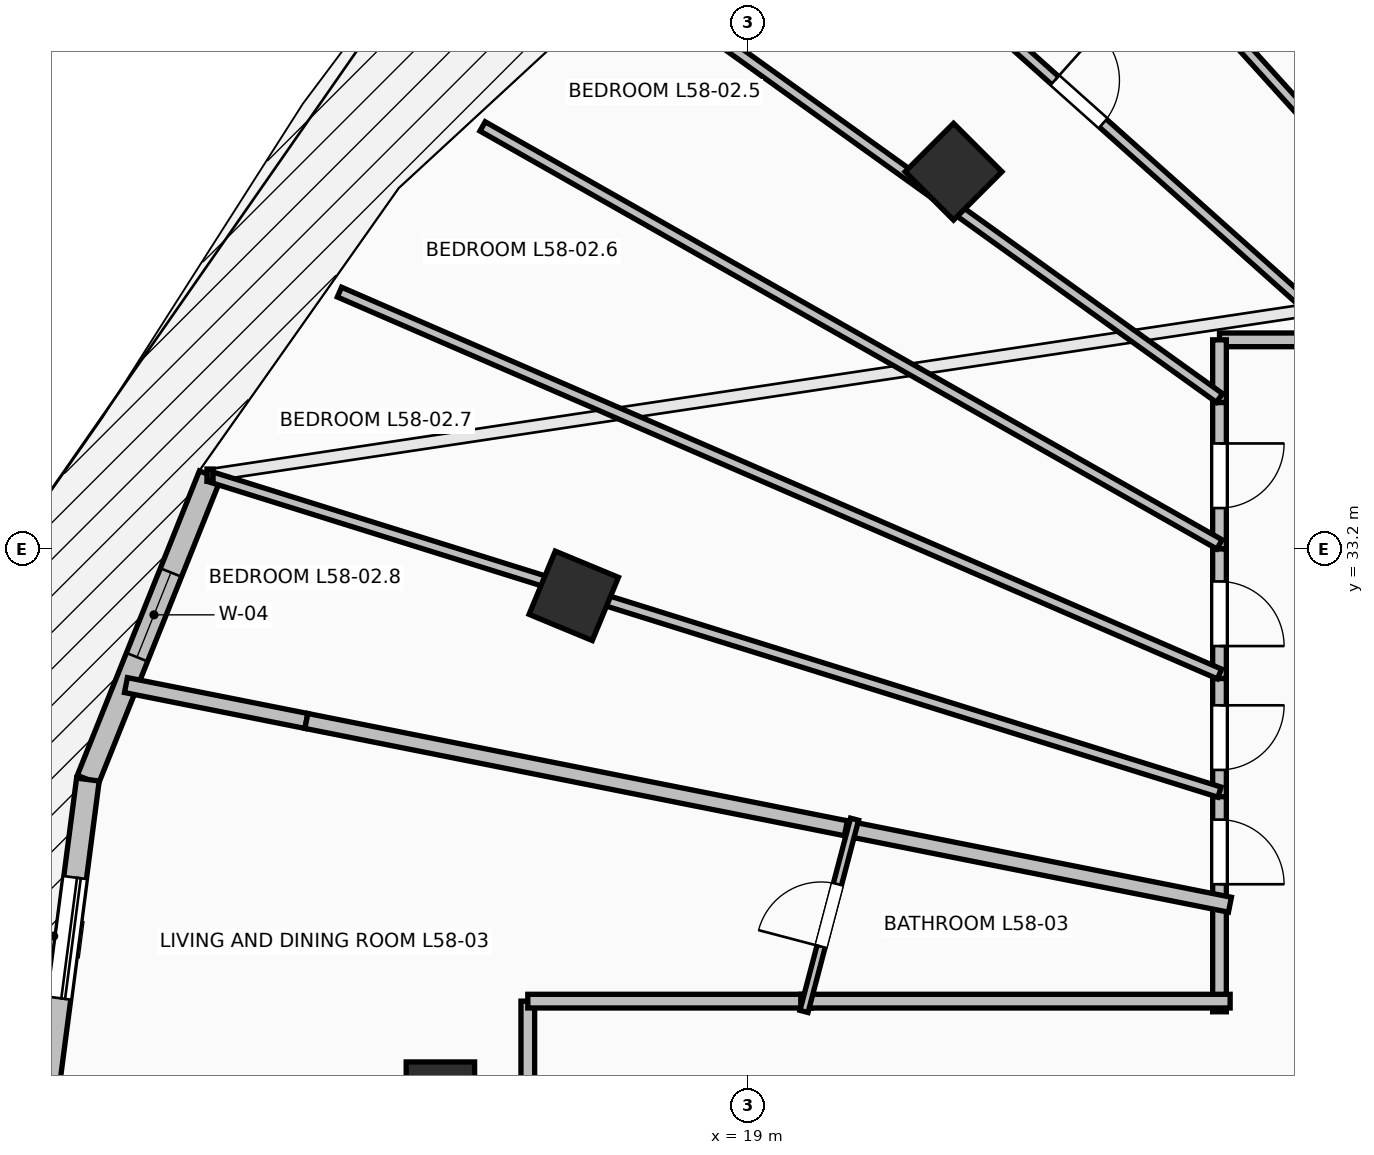
"""IFC4 building model, lengths in metres.
Left out: names, types, materials, properties, quantities, classifications, styles, units other than length and angle.
Written with IfcOpenShell. Run it as: python <this file> out.ifc"""

import sys

from ifc_helpers import new_model, si_unit, direction, frame, frame_2d, origin, origin_2d, place, context, subcontext, project, spatial, rectangle, extrude, element, fill, save


model = new_model("IFC4")
c1 = context("Model", 3, precision=1e-05, world=origin(), true_north=direction((0.0, 1.0)))
c2 = subcontext(c1, "Body", "Model", "MODEL_VIEW")
j1 = project(units=[si_unit("LENGTHUNIT", "METRE"), si_unit("PLANEANGLEUNIT", "RADIAN")], contexts=[c1])
p1 = place(None, origin())
s1 = spatial("IfcSite", under=j1, at=p1, CompositionType="ELEMENT")
p2 = place(p1, origin())
s2 = spatial("IfcBuilding", under=s1, at=p2, CompositionType="ELEMENT")
p3 = place(p2, frame((0.0, 0.0, 214.3)))
s3 = spatial("IfcBuildingStorey", under=s2, at=p3, CompositionType="ELEMENT", Elevation=214.3)
for number, where, z_axis, x_axis in (
    (1, (21.701, 38.162, 0.0), (0.0, 0.0, 1.0), (-0.707, 0.707, 0.0)),
    (2, (16.705, 32.582, 0.0), (0.0, 0.0, 1.0), (-0.924, 0.383, 0.0)),
    (3, (14.95, 26.0, 0.0), (0.0, 0.0, 1.0), (-1.0, 0.0, 0.0)),
):
    element("IfcColumn", number, at=place(p3, frame(where, z_axis=z_axis, x_axis=x_axis)), inside=s3, PredefinedType="COLUMN", context=c2, shape_type="SweptSolid", body=[
        extrude(rectangle(XDim=0.9, YDim=0.9, at=origin_2d()), origin(), (0.0, 0.0, 1.0), 3.55),
    ])
p4 = place(p3, frame((11.919, 34.17, 0.0), z_axis=(0.0, 0.0, 1.0), x_axis=(-0.372268409848, -0.928125116043, 0.0)))
e4 = element("IfcWall", 4, at=p4, inside=s3, PredefinedType="STANDARD", context=c2, shape_type="SweptSolid", body=[
    extrude(rectangle(XDim=4.315, YDim=0.3, at=frame_2d((2.158, 0.0))), origin(), (0.0, 0.0, 1.0), 3.29),
])
p5 = place(p4, frame((1.38, 0.0, 0.85)))
e5 = element("IfcOpeningElement", 5, at=p5, cuts=e4, PredefinedType="OPENING", context=c2, shape_type="SweptSolid", body=[
    extrude(rectangle(XDim=1.2, YDim=1.95, at=frame_2d((0.6, 0.975))), frame((0.0, 0.165, 0.0), z_axis=(0.0, -1.0, 0.0), x_axis=(1.0, 0.0, 0.0)), (0.0, 0.0, 1.0), 0.33),
])
p6 = place(p3, frame((10.312, 30.165, 0.0), z_axis=(0.0, 0.0, 1.0), x_axis=(-0.129147853268, -0.991625348605, 0.0)))
e6 = element("IfcWall", 6, at=p6, inside=s3, PredefinedType="STANDARD", context=c2, shape_type="SweptSolid", body=[
    extrude(rectangle(XDim=4.2, YDim=0.3, at=frame_2d((2.1, 0.0))), origin(), (0.0, 0.0, 1.0), 3.29),
])
p7 = place(p6, frame((1.3, 0.0, 0.0)))
e7 = element("IfcOpeningElement", 7, at=p7, cuts=e6, PredefinedType="OPENING", context=c2, shape_type="SweptSolid", body=[
    extrude(rectangle(XDim=1.6, YDim=2.3, at=frame_2d((0.8, 1.15))), frame((0.0, 0.165, 0.0), z_axis=(0.0, -1.0, 0.0), x_axis=(1.0, 0.0, 0.0)), (0.0, 0.0, 1.0), 0.33),
])
p8 = place(p3, frame((26.768, 35.95, 0.0), z_axis=(0.0, 0.0, 1.0), x_axis=(-1.0, 0.0, 0.0)))
e8 = element("IfcWall", 8, at=p8, inside=s3, PredefinedType="PARTITIONING", context=c2, shape_type="SweptSolid", body=[
    extrude(rectangle(XDim=1.568, YDim=0.18, at=frame_2d((0.784, 0.0))), origin(), (0.0, 0.0, 1.0), 3.29),
])
p9 = place(p3, frame((25.2, 35.95, 0.0), z_axis=(0.0, 0.0, 1.0), x_axis=(0.0, -1.0, 0.0)))
e9 = element("IfcWall", 9, at=p9, inside=s3, PredefinedType="PARTITIONING", context=c2, shape_type="SweptSolid", body=[
    extrude(rectangle(XDim=0.825, YDim=0.18, at=frame_2d((0.413, 0.0))), origin(), (0.0, 0.0, 1.0), 2.482),
])
p10 = place(p3, frame((25.2, 35.125, 0.0), z_axis=(0.0, 0.0, 1.0), x_axis=(0.0, -1.0, 0.0)))
e10 = element("IfcWall", 10, at=p10, inside=s3, PredefinedType="PARTITIONING", context=c2, shape_type="SweptSolid", body=[
    extrude(rectangle(XDim=1.926, YDim=0.18, at=frame_2d((0.963, 0.0))), origin(), (0.0, 0.0, 1.0), 2.482),
])
p11 = place(p10, frame((0.538, 0.0, 0.0)))
e11 = element("IfcOpeningElement", 11, at=p11, cuts=e10, PredefinedType="OPENING", context=c2, shape_type="SweptSolid", body=[
    extrude(rectangle(XDim=0.85, YDim=2.1, at=frame_2d((0.425, 1.05))), frame((0.0, 0.105, 0.0), z_axis=(0.0, -1.0, 0.0), x_axis=(1.0, 0.0, 0.0)), (0.0, 0.0, 1.0), 0.21),
])
p12 = place(p3, frame((25.2, 33.199, 0.0), z_axis=(0.0, 0.0, 1.0), x_axis=(0.0, -1.0, 0.0)))
e12 = element("IfcWall", 12, at=p12, inside=s3, PredefinedType="PARTITIONING", context=c2, shape_type="SweptSolid", body=[
    extrude(rectangle(XDim=1.705, YDim=0.18, at=frame_2d((0.853, 0.0))), origin(), (0.0, 0.0, 1.0), 2.979),
])
p13 = place(p12, frame((0.427, 0.0, 0.0)))
e13 = element("IfcOpeningElement", 13, at=p13, cuts=e12, PredefinedType="OPENING", context=c2, shape_type="SweptSolid", body=[
    extrude(rectangle(XDim=0.85, YDim=2.1, at=frame_2d((0.425, 1.05))), frame((0.0, 0.105, 0.0), z_axis=(0.0, -1.0, 0.0), x_axis=(1.0, 0.0, 0.0)), (0.0, 0.0, 1.0), 0.21),
])
p14 = place(p3, frame((25.2, 31.494, 0.0), z_axis=(0.0, 0.0, 1.0), x_axis=(0.0, -1.0, 0.0)))
e14 = element("IfcWall", 14, at=p14, inside=s3, PredefinedType="PARTITIONING", context=c2, shape_type="SweptSolid", body=[
    extrude(rectangle(XDim=1.554, YDim=0.18, at=frame_2d((0.777, 0.0))), origin(), (0.0, 0.0, 1.0), 3.29),
])
p15 = place(p14, frame((0.352, 0.0, 0.0)))
e15 = element("IfcOpeningElement", 15, at=p15, cuts=e14, PredefinedType="OPENING", context=c2, shape_type="SweptSolid", body=[
    extrude(rectangle(XDim=0.85, YDim=2.1, at=frame_2d((0.425, 1.05))), frame((0.0, 0.105, 0.0), z_axis=(0.0, -1.0, 0.0), x_axis=(1.0, 0.0, 0.0)), (0.0, 0.0, 1.0), 0.21),
])
p16 = place(p3, frame((25.2, 29.94, 0.0), z_axis=(0.0, 0.0, 1.0), x_axis=(0.0, -1.0, 0.0)))
e16 = element("IfcWall", 16, at=p16, inside=s3, PredefinedType="PARTITIONING", context=c2, shape_type="SweptSolid", body=[
    extrude(rectangle(XDim=1.454, YDim=0.18, at=frame_2d((0.727, 0.0))), origin(), (0.0, 0.0, 1.0), 2.482),
])
p17 = place(p16, frame((0.302, 0.0, 0.0)))
e17 = element("IfcOpeningElement", 17, at=p17, cuts=e16, PredefinedType="OPENING", context=c2, shape_type="SweptSolid", body=[
    extrude(rectangle(XDim=0.85, YDim=2.1, at=frame_2d((0.425, 1.05))), frame((0.0, 0.105, 0.0), z_axis=(0.0, -1.0, 0.0), x_axis=(1.0, 0.0, 0.0)), (0.0, 0.0, 1.0), 0.21),
])
p18 = place(p3, frame((16.1, 27.25, 0.0), z_axis=(0.0, 0.0, 1.0), x_axis=(0.0, -1.0, 0.0)))
e18 = element("IfcWall", 18, at=p18, inside=s3, PredefinedType="PARTITIONING", context=c2, shape_type="SweptSolid", body=[
    extrude(rectangle(XDim=2.7, YDim=0.18, at=frame_2d((1.35, 0.0))), origin(), (0.0, 0.0, 1.0), 2.482),
])
p19 = place(p3, frame((19.831, 27.25, 0.0), z_axis=(0.0, 0.0, 1.0), x_axis=(-1.0, 0.0, 0.0)))
e19 = element("IfcWall", 19, at=p19, inside=s3, PredefinedType="PARTITIONING", context=c2, shape_type="SweptSolid", body=[
    extrude(rectangle(XDim=3.731, YDim=0.18, at=frame_2d((1.865, 0.0))), origin(), (0.0, 0.0, 1.0), 2.936),
])
p20 = place(p3, frame((25.2, 28.626, 0.0), z_axis=(0.0, 0.0, 1.0), x_axis=(0.0, -1.0, 0.0)))
e20 = element("IfcWall", 20, at=p20, inside=s3, PredefinedType="PARTITIONING", context=c2, shape_type="SweptSolid", body=[
    extrude(rectangle(XDim=1.516, YDim=0.18, at=frame_2d((0.758, 0.0))), origin(), (0.0, 0.0, 1.0), 2.482),
])
p21 = place(p3, frame((25.34, 27.25, 0.0), z_axis=(0.0, 0.0, 1.0), x_axis=(-1.0, 0.0, 0.0)))
e21 = element("IfcWall", 21, at=p21, inside=s3, PredefinedType="PARTITIONING", context=c2, shape_type="SweptSolid", body=[
    extrude(rectangle(XDim=5.649, YDim=0.18, at=frame_2d((2.825, 0.0))), origin(), (0.0, 0.0, 1.0), 2.482),
])
p22 = place(p3, frame((24.46, 44.617, 0.0), z_axis=(0.0, 0.0, 1.0), x_axis=(0.588154087929, -0.808748891098, 0.0)))
e22 = element("IfcWall", 22, at=p22, inside=s3, PredefinedType="PARTITIONING", context=c2, shape_type="SweptSolid", body=[
    extrude(rectangle(XDim=10.717, YDim=0.14, at=frame_2d((5.358, 0.0))), origin(), (0.0, 0.0, 1.0), 2.482),
])
p23 = place(p3, frame((22.077, 43.603, 0.0), z_axis=(0.0, 0.0, 1.0), x_axis=(0.670853853748, -0.741589581177, 0.0)))
e23 = element("IfcWall", 23, at=p23, inside=s3, PredefinedType="PARTITIONING", context=c2, shape_type="SweptSolid", body=[
    extrude(rectangle(XDim=10.32, YDim=0.14, at=frame_2d((5.16, 0.0))), origin(), (0.0, 0.0, 1.0), 2.482),
])
p24 = place(p3, frame((19.844, 42.214, 0.0), z_axis=(0.0, 0.0, 1.0), x_axis=(0.745845988041, -0.666118429502, 0.0)))
e24 = element("IfcWall", 24, at=p24, inside=s3, PredefinedType="PARTITIONING", context=c2, shape_type="SweptSolid", body=[
    extrude(rectangle(XDim=9.404, YDim=0.14, at=frame_2d((4.702, 0.0))), origin(), (0.0, 0.0, 1.0), 2.824),
])
p25 = place(p24, frame((4.277, 0.0, 0.0)))
e25 = element("IfcOpeningElement", 25, at=p25, cuts=e24, PredefinedType="OPENING", context=c2, shape_type="SweptSolid", body=[
    extrude(rectangle(XDim=0.85, YDim=2.1, at=frame_2d((0.425, 1.05))), frame((0.0, 0.085, 0.0), z_axis=(0.0, -1.0, 0.0), x_axis=(1.0, 0.0, 0.0)), (0.0, 0.0, 1.0), 0.17),
])
p26 = place(p3, frame((17.568, 40.662, 0.0), z_axis=(0.0, 0.0, 1.0), x_axis=(0.812435479674, -0.583051105279, 0.0)))
e26 = element("IfcWall", 26, at=p26, inside=s3, PredefinedType="PARTITIONING", context=c2, shape_type="SweptSolid", body=[
    extrude(rectangle(XDim=9.394, YDim=0.14, at=frame_2d((4.697, 0.0))), origin(), (0.0, 0.0, 1.0), 2.482),
])
p27 = place(p3, frame((15.505, 38.758, 0.0), z_axis=(0.0, 0.0, 1.0), x_axis=(0.86982387552, -0.49336236741, 0.0)))
e27 = element("IfcWall", 27, at=p27, inside=s3, PredefinedType="PARTITIONING", context=c2, shape_type="SweptSolid", body=[
    extrude(rectangle(XDim=11.146, YDim=0.14, at=frame_2d((5.573, 0.0))), origin(), (0.0, 0.0, 1.0), 2.824),
])
p28 = place(p3, frame((13.622, 36.578, 0.0), z_axis=(0.0, 0.0, 1.0), x_axis=(0.917357672996, -0.398063939331, 0.0)))
e28 = element("IfcWall", 28, at=p28, inside=s3, PredefinedType="PARTITIONING", context=c2, shape_type="SweptSolid", body=[
    extrude(rectangle(XDim=12.621, YDim=0.14, at=frame_2d((6.311, 0.0))), origin(), (0.0, 0.0, 1.0), 2.824),
])
p29 = place(p3, frame((11.911, 34.152, 0.0), z_axis=(0.0, 0.0, 1.0), x_axis=(0.954494953812, -0.298227066422, 0.0)))
e29 = element("IfcWall", 29, at=p29, inside=s3, PredefinedType="PARTITIONING", context=c2, shape_type="SweptSolid", body=[
    extrude(rectangle(XDim=13.923, YDim=0.14, at=frame_2d((6.961, 0.0))), origin(), (0.0, 0.0, 1.0), 2.482),
])
p30 = place(p3, frame((10.813, 31.408, 0.0), z_axis=(0.0, 0.0, 1.0), x_axis=(0.980808893275, -0.194971574527, 0.0)))
e30 = element("IfcWall", 30, at=p30, inside=s3, PredefinedType="PARTITIONING", context=c2, shape_type="SweptSolid", body=[
    extrude(rectangle(XDim=2.42, YDim=0.2, at=frame_2d((1.21, 0.0))), origin(), (0.0, 0.0, 1.0), 3.29),
])
p31 = place(p3, frame((13.187, 30.936, 0.0), z_axis=(0.0, 0.0, 1.0), x_axis=(0.980790143568, -0.195065871645, 0.0)))
e31 = element("IfcWall", 31, at=p31, inside=s3, PredefinedType="PARTITIONING", context=c2, shape_type="SweptSolid", body=[
    extrude(rectangle(XDim=7.377, YDim=0.2, at=frame_2d((3.688, 0.0))), origin(), (0.0, 0.0, 1.0), 2.824),
])
p32 = place(p3, frame((20.285, 29.524, 0.0), z_axis=(0.0, 0.0, 1.0), x_axis=(0.980782472544, -0.195104437547, 0.0)))
e32 = element("IfcWall", 32, at=p32, inside=s3, PredefinedType="PARTITIONING", context=c2, shape_type="SweptSolid", body=[
    extrude(rectangle(XDim=5.152, YDim=0.2, at=frame_2d((2.576, 0.0))), origin(), (0.0, 0.0, 1.0), 2.936),
])
p33 = place(p3, frame((19.733, 27.115, 0.0), z_axis=(0.0, 0.0, 1.0), x_axis=(0.254424362052, 0.967092676011, 0.0)))
e33 = element("IfcWall", 33, at=p33, inside=s3, PredefinedType="PARTITIONING", context=c2, shape_type="SweptSolid", body=[
    extrude(rectangle(XDim=2.615, YDim=0.11, at=frame_2d((1.307, 0.0))), origin(), (0.0, 0.0, 1.0), 2.482),
])
p34 = place(p33, frame((0.882, 0.0, 0.0)))
e34 = element("IfcOpeningElement", 34, at=p34, cuts=e33, PredefinedType="OPENING", context=c2, shape_type="SweptSolid", body=[
    extrude(rectangle(XDim=0.85, YDim=2.1, at=frame_2d((0.425, 1.05))), frame((0.0, 0.07, 0.0), z_axis=(0.0, -1.0, 0.0), x_axis=(1.0, 0.0, 0.0)), (0.0, 0.0, 1.0), 0.14),
])
p35 = place(p7, origin())
e35 = element("IfcDoor", 35, at=p35, inside=s3, OperationType="SLIDING_TO_LEFT", PredefinedType="DOOR", context=c2, shape_type="SweptSolid", body=[
    extrude(rectangle(XDim=1.6, YDim=2.3, at=frame_2d((0.8, 1.15))), frame((0.0, 0.025, 0.0), z_axis=(0.0, -1.0, 0.0), x_axis=(1.0, 0.0, 0.0)), (0.0, 0.0, 1.0), 0.05),
])
fill(e7, e35)
p36 = place(p5, origin())
e36 = element("IfcWindow", 36, at=p36, inside=s3, PartitioningType="SINGLE_PANEL", PredefinedType="WINDOW", context=c2, shape_type="SweptSolid", body=[
    extrude(rectangle(XDim=1.2, YDim=1.95, at=frame_2d((0.6, 0.975))), frame((0.0, 0.03, 0.0), z_axis=(0.0, -1.0, 0.0), x_axis=(1.0, 0.0, 0.0)), (0.0, 0.0, 1.0), 0.06),
])
fill(e5, e36)
p37 = place(p34, origin())
e37 = element("IfcDoor", 37, at=p37, inside=s3, OperationType="SINGLE_SWING_LEFT", PredefinedType="DOOR", context=c2, shape_type="SweptSolid", body=[
    extrude(rectangle(XDim=0.85, YDim=2.1, at=frame_2d((0.425, 1.05))), frame((0.0, 0.025, 0.0), z_axis=(0.0, -1.0, 0.0), x_axis=(1.0, 0.0, 0.0)), (0.0, 0.0, 1.0), 0.05),
])
fill(e34, e37)
p38 = place(p11, origin())
e38 = element("IfcDoor", 38, at=p38, inside=s3, OperationType="SINGLE_SWING_LEFT", PredefinedType="DOOR", context=c2, shape_type="SweptSolid", body=[
    extrude(rectangle(XDim=0.85, YDim=2.1, at=frame_2d((0.425, 1.05))), frame((0.0, 0.025, 0.0), z_axis=(0.0, -1.0, 0.0), x_axis=(1.0, 0.0, 0.0)), (0.0, 0.0, 1.0), 0.05),
])
fill(e11, e38)
p39 = place(p13, origin())
e39 = element("IfcDoor", 39, at=p39, inside=s3, OperationType="SINGLE_SWING_RIGHT", PredefinedType="DOOR", context=c2, shape_type="SweptSolid", body=[
    extrude(rectangle(XDim=0.85, YDim=2.1, at=frame_2d((0.425, 1.05))), frame((0.0, 0.025, 0.0), z_axis=(0.0, -1.0, 0.0), x_axis=(1.0, 0.0, 0.0)), (0.0, 0.0, 1.0), 0.05),
])
fill(e13, e39)
p40 = place(p15, origin())
e40 = element("IfcDoor", 40, at=p40, inside=s3, OperationType="SINGLE_SWING_LEFT", PredefinedType="DOOR", context=c2, shape_type="SweptSolid", body=[
    extrude(rectangle(XDim=0.85, YDim=2.1, at=frame_2d((0.425, 1.05))), frame((0.0, 0.025, 0.0), z_axis=(0.0, -1.0, 0.0), x_axis=(1.0, 0.0, 0.0)), (0.0, 0.0, 1.0), 0.05),
])
fill(e15, e40)
p41 = place(p17, origin())
e41 = element("IfcDoor", 41, at=p41, inside=s3, OperationType="SINGLE_SWING_RIGHT", PredefinedType="DOOR", context=c2, shape_type="SweptSolid", body=[
    extrude(rectangle(XDim=0.85, YDim=2.1, at=frame_2d((0.425, 1.05))), frame((0.0, 0.025, 0.0), z_axis=(0.0, -1.0, 0.0), x_axis=(1.0, 0.0, 0.0)), (0.0, 0.0, 1.0), 0.05),
])
fill(e17, e41)
p42 = place(p25, origin())
e42 = element("IfcDoor", 42, at=p42, inside=s3, OperationType="SINGLE_SWING_LEFT", PredefinedType="DOOR", context=c2, shape_type="SweptSolid", body=[
    extrude(rectangle(XDim=0.85, YDim=2.1, at=frame_2d((0.425, 1.05))), frame((0.0, 0.025, 0.0), z_axis=(0.0, -1.0, 0.0), x_axis=(1.0, 0.0, 0.0)), (0.0, 0.0, 1.0), 0.05),
])
fill(e25, e42)
save(model, sys.argv[1])
